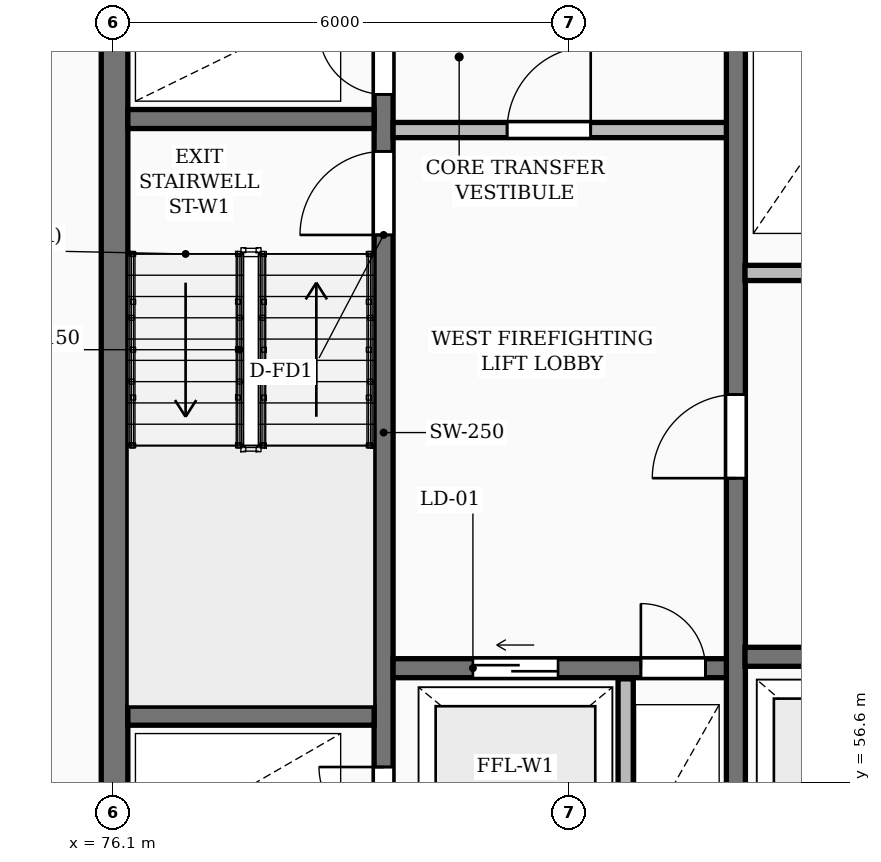
"""IFC4 building model, lengths in metres.
Left out: names, types, materials, properties, quantities, classifications, styles, units other than length and angle.
Written with IfcOpenShell. Run it as: python <this file> out.ifc"""

import sys

from ifc_helpers import new_model, si_unit, direction, frame, frame_2d, origin, place, context, subcontext, project, spatial, rectangle, extrude, element, fill, save


model = new_model("IFC4")
c1 = context("Model", 3, precision=1e-05, world=origin(), true_north=direction((0.0, 1.0)))
c2 = subcontext(c1, "Body", "Model", "MODEL_VIEW")
j1 = project(units=[si_unit("LENGTHUNIT", "METRE"), si_unit("PLANEANGLEUNIT", "RADIAN")], contexts=[c1])
p1 = place(None, origin())
s1 = spatial("IfcSite", under=j1, at=p1, CompositionType="ELEMENT")
p2 = place(p1, origin())
s2 = spatial("IfcBuilding", under=s1, at=p2, CompositionType="ELEMENT")
p3 = place(p2, frame((0.0, 0.0, -3.6)))
s3 = spatial("IfcBuildingStorey", under=s2, at=p3, CompositionType="ELEMENT", Elevation=-3.6)
p4 = place(p3, frame((76.125, 55.375, 0.0), z_axis=(0.0, 0.0, 1.0), x_axis=(0.0, 1.0, 0.0)))
e1 = element("IfcWall", 1, at=p4, inside=s3, PredefinedType="SHEAR", context=c2, shape_type="SweptSolid", body=[
    extrude(rectangle(XDim=11.65, YDim=0.35, at=frame_2d((5.825, 0.0))), origin(), (0.0, 0.0, 1.0), 3.6),
])
p5 = place(p3, frame((79.665, 55.4, 0.0), z_axis=(0.0, 0.0, 1.0), x_axis=(0.0, 1.0, 0.0)))
e2 = element("IfcWall", 2, at=p5, inside=s3, PredefinedType="SHEAR", context=c2, shape_type="SweptSolid", body=[
    extrude(rectangle(XDim=11.6, YDim=0.25, at=frame_2d((5.8, 0.0))), origin(), (0.0, 0.0, 1.0), 3.6),
])
p6 = place(p5, frame((0.55, 0.0, 0.0)))
e3 = element("IfcOpeningElement", 3, at=p6, cuts=e2, PredefinedType="OPENING", context=c2, shape_type="SweptSolid", body=[
    extrude(rectangle(XDim=0.85, YDim=2.05, at=frame_2d((0.425, 1.025))), frame((0.0, 0.135, 0.0), z_axis=(0.0, -1.0, 0.0), x_axis=(1.0, 0.0, 0.0)), (0.0, 0.0, 1.0), 0.27),
])
p7 = place(p5, frame((8.4, 0.0, 0.0)))
e4 = element("IfcOpeningElement", 4, at=p7, cuts=e2, PredefinedType="OPENING", context=c2, shape_type="SweptSolid", body=[
    extrude(rectangle(XDim=1.1, YDim=2.1, at=frame_2d((0.55, 1.05))), frame((0.0, 0.135, 0.0), z_axis=(0.0, -1.0, 0.0), x_axis=(1.0, 0.0, 0.0)), (0.0, 0.0, 1.0), 0.27),
])
p8 = place(p5, frame((10.25, 0.0, 0.0)))
e5 = element("IfcOpeningElement", 5, at=p8, cuts=e2, PredefinedType="OPENING", context=c2, shape_type="SweptSolid", body=[
    extrude(rectangle(XDim=0.85, YDim=2.05, at=frame_2d((0.425, 1.025))), frame((0.0, 0.135, 0.0), z_axis=(0.0, -1.0, 0.0), x_axis=(1.0, 0.0, 0.0)), (0.0, 0.0, 1.0), 0.27),
])
for number, where, z_axis, x_axis in (
    (6, (76.3, 57.475, 0.0), (0.0, 0.0, 1.0), (1.0, 0.0, 0.0)),
    (7, (76.3, 65.325, 0.0), (0.0, 0.0, 1.0), (1.0, 0.0, 0.0)),
):
    element("IfcWall", number, at=place(p3, frame(where, z_axis=z_axis, x_axis=x_axis)), inside=s3, PredefinedType="SHEAR", context=c2, shape_type="SweptSolid", body=[
        extrude(rectangle(XDim=3.24, YDim=0.25, at=frame_2d((1.62, 0.0))), origin(), (0.0, 0.0, 1.0), 3.6),
    ])
p9 = place(p3, frame((79.79, 58.1, 0.0), z_axis=(0.0, 0.0, 1.0), x_axis=(1.0, 0.0, 0.0)))
e8 = element("IfcWall", 8, at=p9, inside=s3, PredefinedType="SHEAR", context=c2, shape_type="SweptSolid", body=[
    extrude(rectangle(XDim=4.39, YDim=0.25, at=frame_2d((2.195, 0.0))), origin(), (0.0, 0.0, 1.0), 3.6),
])
p10 = place(p9, frame((1.05, 0.0, 0.0)))
e9 = element("IfcOpeningElement", 9, at=p10, cuts=e8, PredefinedType="OPENING", context=c2, shape_type="SweptSolid", body=[
    extrude(rectangle(XDim=1.12, YDim=2.12, at=frame_2d((0.56, 1.06))), frame((0.0, 0.135, 0.0), z_axis=(0.0, -1.0, 0.0), x_axis=(1.0, 0.0, 0.0)), (0.0, 0.0, 1.0), 0.27),
])
p11 = place(p9, frame((3.26, 0.0, 0.0)))
e10 = element("IfcOpeningElement", 10, at=p11, cuts=e8, PredefinedType="OPENING", context=c2, shape_type="SweptSolid", body=[
    extrude(rectangle(XDim=0.85, YDim=2.05, at=frame_2d((0.425, 1.025))), frame((0.0, 0.135, 0.0), z_axis=(0.0, -1.0, 0.0), x_axis=(1.0, 0.0, 0.0)), (0.0, 0.0, 1.0), 0.27),
])
p12 = place(p3, frame((82.85, 55.4, 0.0), z_axis=(0.0, 0.0, 1.0), x_axis=(0.0, 1.0, 0.0)))
e11 = element("IfcWall", 11, at=p12, inside=s3, PredefinedType="PARTITIONING", context=c2, shape_type="SweptSolid", body=[
    extrude(rectangle(XDim=2.56, YDim=0.2, at=frame_2d((1.28, 0.0))), origin(), (0.0, 0.0, 1.0), 3.3),
])
p13 = place(p3, frame((79.79, 65.18, 0.0), z_axis=(0.0, 0.0, 1.0), x_axis=(1.0, 0.0, 0.0)))
e12 = element("IfcWall", 12, at=p13, inside=s3, PredefinedType="PARTITIONING", context=c2, shape_type="SweptSolid", body=[
    extrude(rectangle(XDim=4.39, YDim=0.2, at=frame_2d((2.195, 0.0))), origin(), (0.0, 0.0, 1.0), 3.3),
])
p14 = place(p13, frame((1.5, 0.0, 0.0)))
e13 = element("IfcOpeningElement", 13, at=p14, cuts=e12, PredefinedType="OPENING", context=c2, shape_type="SweptSolid", body=[
    extrude(rectangle(XDim=1.1, YDim=2.1, at=frame_2d((0.55, 1.05))), frame((0.0, 0.11, 0.0), z_axis=(0.0, -1.0, 0.0), x_axis=(1.0, 0.0, 0.0)), (0.0, 0.0, 1.0), 0.22),
])
p15 = place(p3, frame((84.3, 55.4, 0.0), z_axis=(0.0, 0.0, 1.0), x_axis=(0.0, 1.0, 0.0)))
e14 = element("IfcWall", 14, at=p15, inside=s3, PredefinedType="SHEAR", context=c2, shape_type="SweptSolid", body=[
    extrude(rectangle(XDim=11.6, YDim=0.25, at=frame_2d((5.8, 0.0))), origin(), (0.0, 0.0, 1.0), 3.6),
])
p16 = place(p15, frame((5.2, 0.0, 0.0)))
e15 = element("IfcOpeningElement", 15, at=p16, cuts=e14, PredefinedType="OPENING", context=c2, shape_type="SweptSolid", body=[
    extrude(rectangle(XDim=1.1, YDim=2.1, at=frame_2d((0.55, 1.05))), frame((0.0, 0.135, 0.0), z_axis=(0.0, -1.0, 0.0), x_axis=(1.0, 0.0, 0.0)), (0.0, 0.0, 1.0), 0.27),
])
p17 = place(p3, frame((84.42, 58.25, 0.0), z_axis=(0.0, 0.0, 1.0), x_axis=(1.0, 0.0, 0.0)))
e16 = element("IfcWall", 16, at=p17, inside=s3, PredefinedType="SHEAR", context=c2, shape_type="SweptSolid", body=[
    extrude(rectangle(XDim=8.36, YDim=0.25, at=frame_2d((4.18, 0.0))), origin(), (0.0, 0.0, 1.0), 3.6),
])
p18 = place(p17, frame((0.82, 0.0, 0.0)))
e17 = element("IfcOpeningElement", 17, at=p18, cuts=e16, PredefinedType="OPENING", context=c2, shape_type="SweptSolid", body=[
    extrude(rectangle(XDim=1.12, YDim=2.12, at=frame_2d((0.56, 1.06))), frame((0.0, 0.135, 0.0), z_axis=(0.0, -1.0, 0.0), x_axis=(1.0, 0.0, 0.0)), (0.0, 0.0, 1.0), 0.27),
])
p19 = place(p17, frame((3.62, 0.0, 0.0)))
e18 = element("IfcOpeningElement", 18, at=p19, cuts=e16, PredefinedType="OPENING", context=c2, shape_type="SweptSolid", body=[
    extrude(rectangle(XDim=1.12, YDim=2.12, at=frame_2d((0.56, 1.06))), frame((0.0, 0.135, 0.0), z_axis=(0.0, -1.0, 0.0), x_axis=(1.0, 0.0, 0.0)), (0.0, 0.0, 1.0), 0.27),
])
p20 = place(p17, frame((6.42, 0.0, 0.0)))
e19 = element("IfcOpeningElement", 19, at=p20, cuts=e16, PredefinedType="OPENING", context=c2, shape_type="SweptSolid", body=[
    extrude(rectangle(XDim=1.12, YDim=2.12, at=frame_2d((0.56, 1.06))), frame((0.0, 0.135, 0.0), z_axis=(0.0, -1.0, 0.0), x_axis=(1.0, 0.0, 0.0)), (0.0, 0.0, 1.0), 0.27),
])
p21 = place(p3, frame((84.42, 63.3, 0.0), z_axis=(0.0, 0.0, 1.0), x_axis=(1.0, 0.0, 0.0)))
e20 = element("IfcWall", 20, at=p21, inside=s3, PredefinedType="PARTITIONING", context=c2, shape_type="SweptSolid", body=[
    extrude(rectangle(XDim=19.83, YDim=0.2, at=frame_2d((9.915, 0.0))), origin(), (0.0, 0.0, 1.0), 3.3),
])
p22 = place(p21, frame((1.15, 0.0, 0.0)))
e21 = element("IfcOpeningElement", 21, at=p22, cuts=e20, PredefinedType="OPENING", context=c2, shape_type="SweptSolid", body=[
    extrude(rectangle(XDim=0.85, YDim=2.05, at=frame_2d((0.425, 1.025))), frame((0.0, 0.11, 0.0), z_axis=(0.0, -1.0, 0.0), x_axis=(1.0, 0.0, 0.0)), (0.0, 0.0, 1.0), 0.22),
])
p23 = place(p21, frame((3.25, 0.0, 0.0)))
e22 = element("IfcOpeningElement", 22, at=p23, cuts=e20, PredefinedType="OPENING", context=c2, shape_type="SweptSolid", body=[
    extrude(rectangle(XDim=0.85, YDim=2.05, at=frame_2d((0.425, 1.025))), frame((0.0, 0.11, 0.0), z_axis=(0.0, -1.0, 0.0), x_axis=(1.0, 0.0, 0.0)), (0.0, 0.0, 1.0), 0.22),
])
p24 = place(p21, frame((13.08, 0.0, 0.0)))
e23 = element("IfcOpeningElement", 23, at=p24, cuts=e20, PredefinedType="OPENING", context=c2, shape_type="SweptSolid", body=[
    extrude(rectangle(XDim=1.5, YDim=2.2, at=frame_2d((0.75, 1.1))), frame((0.0, 0.11, 0.0), z_axis=(0.0, -1.0, 0.0), x_axis=(1.0, 0.0, 0.0)), (0.0, 0.0, 1.0), 0.22),
])
p25 = place(p21, frame((6.68, 0.0, 0.0)))
e24 = element("IfcOpeningElement", 24, at=p25, cuts=e20, PredefinedType="OPENING", context=c2, shape_type="SweptSolid", body=[
    extrude(rectangle(XDim=0.92, YDim=2.08, at=frame_2d((0.46, 1.04))), frame((0.0, 0.11, 0.0), z_axis=(0.0, -1.0, 0.0), x_axis=(1.0, 0.0, 0.0)), (0.0, 0.0, 1.0), 0.22),
])
p26 = place(p21, frame((16.33, 0.0, 0.0)))
e25 = element("IfcOpeningElement", 25, at=p26, cuts=e20, PredefinedType="OPENING", context=c2, shape_type="SweptSolid", body=[
    extrude(rectangle(XDim=0.88, YDim=2.06, at=frame_2d((0.44, 1.03))), frame((0.0, 0.11, 0.0), z_axis=(0.0, -1.0, 0.0), x_axis=(1.0, 0.0, 0.0)), (0.0, 0.0, 1.0), 0.22),
])
p27 = place(p6, origin())
e26 = element("IfcDoor", 26, at=p27, inside=s3, OperationType="SINGLE_SWING_RIGHT", PredefinedType="DOOR", context=c2, shape_type="SweptSolid", body=[
    extrude(rectangle(XDim=0.85, YDim=2.05, at=frame_2d((0.425, 1.025))), frame((0.0, 0.025, 0.0), z_axis=(0.0, -1.0, 0.0), x_axis=(1.0, 0.0, 0.0)), (0.0, 0.0, 1.0), 0.05),
])
fill(e3, e26)
p28 = place(p7, origin())
e27 = element("IfcDoor", 27, at=p28, inside=s3, OperationType="SINGLE_SWING_LEFT", PredefinedType="DOOR", context=c2, shape_type="SweptSolid", body=[
    extrude(rectangle(XDim=1.1, YDim=2.1, at=frame_2d((0.55, 1.05))), frame((0.0, 0.025, 0.0), z_axis=(0.0, -1.0, 0.0), x_axis=(1.0, 0.0, 0.0)), (0.0, 0.0, 1.0), 0.05),
])
fill(e4, e27)
p29 = place(p8, origin())
e28 = element("IfcDoor", 28, at=p29, inside=s3, OperationType="SINGLE_SWING_RIGHT", PredefinedType="DOOR", context=c2, shape_type="SweptSolid", body=[
    extrude(rectangle(XDim=0.85, YDim=2.05, at=frame_2d((0.425, 1.025))), frame((0.0, 0.025, 0.0), z_axis=(0.0, -1.0, 0.0), x_axis=(1.0, 0.0, 0.0)), (0.0, 0.0, 1.0), 0.05),
])
fill(e5, e28)
p30 = place(p10, origin())
e29 = element("IfcDoor", 29, at=p30, inside=s3, OperationType="SLIDING_TO_LEFT", PredefinedType="DOOR", context=c2, shape_type="SweptSolid", body=[
    extrude(rectangle(XDim=1.12, YDim=2.12, at=frame_2d((0.56, 1.06))), frame((0.0, 0.025, 0.0), z_axis=(0.0, -1.0, 0.0), x_axis=(1.0, 0.0, 0.0)), (0.0, 0.0, 1.0), 0.05),
])
fill(e9, e29)
p31 = place(p11, origin())
e30 = element("IfcDoor", 30, at=p31, inside=s3, OperationType="SINGLE_SWING_LEFT", PredefinedType="DOOR", context=c2, shape_type="SweptSolid", body=[
    extrude(rectangle(XDim=0.85, YDim=2.05, at=frame_2d((0.425, 1.025))), frame((0.0, 0.025, 0.0), z_axis=(0.0, -1.0, 0.0), x_axis=(1.0, 0.0, 0.0)), (0.0, 0.0, 1.0), 0.05),
])
fill(e10, e30)
p32 = place(p14, origin())
e31 = element("IfcDoor", 31, at=p32, inside=s3, OperationType="SINGLE_SWING_RIGHT", PredefinedType="DOOR", context=c2, shape_type="SweptSolid", body=[
    extrude(rectangle(XDim=1.1, YDim=2.1, at=frame_2d((0.55, 1.05))), frame((0.0, 0.025, 0.0), z_axis=(0.0, -1.0, 0.0), x_axis=(1.0, 0.0, 0.0)), (0.0, 0.0, 1.0), 0.05),
])
fill(e13, e31)
p33 = place(p16, origin())
e32 = element("IfcDoor", 32, at=p33, inside=s3, OperationType="SINGLE_SWING_LEFT", PredefinedType="DOOR", context=c2, shape_type="SweptSolid", body=[
    extrude(rectangle(XDim=1.1, YDim=2.1, at=frame_2d((0.55, 1.05))), frame((0.0, 0.025, 0.0), z_axis=(0.0, -1.0, 0.0), x_axis=(1.0, 0.0, 0.0)), (0.0, 0.0, 1.0), 0.05),
])
fill(e15, e32)
save(model, sys.argv[1])
